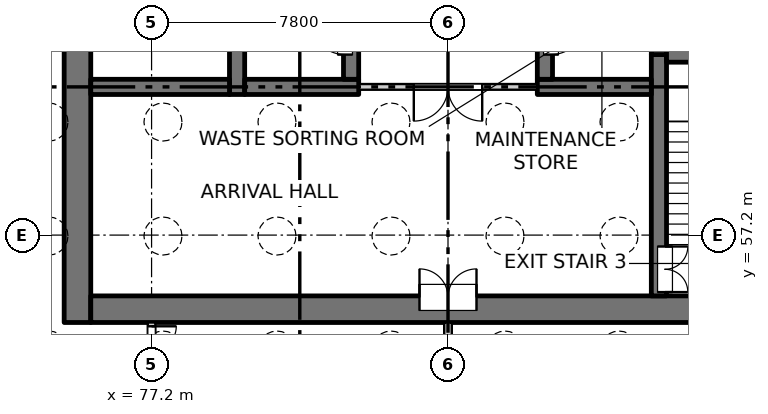
"""IFC4 building model, lengths in metres.
Left out: names, types, materials, properties, quantities, classifications, styles, units other than length and angle.
Written with IfcOpenShell. Run it as: python <this file> out.ifc"""

import sys

from ifc_helpers import new_model, si_unit, direction, frame, frame_2d, origin, place, context, subcontext, project, spatial, rectangle, extrude, element, fill, save


model = new_model("IFC4")
c1 = context("Model", 3, precision=1e-05, world=origin(), true_north=direction((0.0, 1.0)))
c2 = subcontext(c1, "Body", "Model", "MODEL_VIEW")
j1 = project(units=[si_unit("LENGTHUNIT", "METRE"), si_unit("PLANEANGLEUNIT", "RADIAN")], contexts=[c1])
p1 = place(None, origin())
s1 = spatial("IfcSite", under=j1, at=p1, CompositionType="ELEMENT")
p2 = place(p1, origin())
s2 = spatial("IfcBuilding", under=s1, at=p2, CompositionType="ELEMENT")
p3 = place(p2, frame((0.0, 0.0, -9.0)))
s3 = spatial("IfcBuildingStorey", under=s2, at=p3, CompositionType="ELEMENT", Elevation=-9.0)
p4 = place(p3, frame((75.25, 54.9, -0.5), z_axis=(0.0, 0.0, 1.0), x_axis=(0.0, 1.0, 0.0)))
e1 = element("IfcWall", 1, at=p4, inside=s3, PredefinedType="SOLIDWALL", context=c2, shape_type="SweptSolid", body=[
    extrude(rectangle(XDim=22.4, YDim=0.7, at=frame_2d((11.2, 0.0))), origin(), (0.0, 0.0, 1.0), 4.65),
])
p5 = place(p4, frame((7.55, 0.0, 0.5)))
e2 = element("IfcOpeningElement", 2, at=p5, cuts=e1, PredefinedType="OPENING", context=c2, shape_type="SweptSolid", body=[
    extrude(rectangle(XDim=0.9, YDim=2.1, at=frame_2d((0.45, 1.05))), frame((0.0, 0.36, 0.0), z_axis=(0.0, -1.0, 0.0), x_axis=(1.0, 0.0, 0.0)), (0.0, 0.0, 1.0), 0.72),
])
p6 = place(p4, frame((10.85, 0.0, 0.5)))
e3 = element("IfcOpeningElement", 3, at=p6, cuts=e1, PredefinedType="OPENING", context=c2, shape_type="SweptSolid", body=[
    extrude(rectangle(XDim=0.9, YDim=2.1, at=frame_2d((0.45, 1.05))), frame((0.0, 0.36, 0.0), z_axis=(0.0, -1.0, 0.0), x_axis=(1.0, 0.0, 0.0)), (0.0, 0.0, 1.0), 0.72),
])
p7 = place(p4, frame((13.85, 0.0, 0.5)))
e4 = element("IfcOpeningElement", 4, at=p7, cuts=e1, PredefinedType="OPENING", context=c2, shape_type="SweptSolid", body=[
    extrude(rectangle(XDim=0.9, YDim=2.1, at=frame_2d((0.45, 1.05))), frame((0.0, 0.36, 0.0), z_axis=(0.0, -1.0, 0.0), x_axis=(1.0, 0.0, 0.0)), (0.0, 0.0, 1.0), 0.72),
])
p8 = place(p4, frame((16.85, 0.0, 0.5)))
e5 = element("IfcOpeningElement", 5, at=p8, cuts=e1, PredefinedType="OPENING", context=c2, shape_type="SweptSolid", body=[
    extrude(rectangle(XDim=0.9, YDim=2.1, at=frame_2d((0.45, 1.05))), frame((0.0, 0.36, 0.0), z_axis=(0.0, -1.0, 0.0), x_axis=(1.0, 0.0, 0.0)), (0.0, 0.0, 1.0), 0.72),
])
p9 = place(p4, frame((20.15, 0.0, 0.5)))
e6 = element("IfcOpeningElement", 6, at=p9, cuts=e1, PredefinedType="OPENING", context=c2, shape_type="SweptSolid", body=[
    extrude(rectangle(XDim=0.9, YDim=2.1, at=frame_2d((0.45, 1.05))), frame((0.0, 0.36, 0.0), z_axis=(0.0, -1.0, 0.0), x_axis=(1.0, 0.0, 0.0)), (0.0, 0.0, 1.0), 0.72),
])
p10 = place(p3, frame((75.6, 55.25, -0.5), z_axis=(0.0, 0.0, 1.0), x_axis=(1.0, 0.0, 0.0)))
e7 = element("IfcWall", 7, at=p10, inside=s3, PredefinedType="SOLIDWALL", context=c2, shape_type="SweptSolid", body=[
    extrude(rectangle(XDim=18.8, YDim=0.7, at=frame_2d((9.4, 0.0))), origin(), (0.0, 0.0, 1.0), 4.65),
])
p11 = place(p10, frame((8.65, 0.0, 0.5)))
e8 = element("IfcOpeningElement", 8, at=p11, cuts=e7, PredefinedType="OPENING", context=c2, shape_type="SweptSolid", body=[
    extrude(rectangle(XDim=1.5, YDim=2.1, at=frame_2d((0.75, 1.05))), frame((0.0, 0.36, 0.0), z_axis=(0.0, -1.0, 0.0), x_axis=(1.0, 0.0, 0.0)), (0.0, 0.0, 1.0), 0.72),
])
p12 = place(p3, frame((79.45, 60.9, -0.5), z_axis=(0.0, 0.0, 1.0), x_axis=(0.0, 1.0, 0.0)))
e9 = element("IfcWall", 9, at=p12, inside=s3, PredefinedType="SOLIDWALL", context=c2, shape_type="SweptSolid", body=[
    extrude(rectangle(XDim=16.4, YDim=0.4, at=frame_2d((8.2, 0.0))), origin(), (0.0, 0.0, 1.0), 4.65),
])
p13 = place(p3, frame((90.55, 55.6, -0.5), z_axis=(0.0, 0.0, 1.0), x_axis=(0.0, 1.0, 0.0)))
e10 = element("IfcWall", 10, at=p13, inside=s3, PredefinedType="SOLIDWALL", context=c2, shape_type="SweptSolid", body=[
    extrude(rectangle(XDim=6.35, YDim=0.4, at=frame_2d((3.175, 0.0))), origin(), (0.0, 0.0, 1.0), 4.65),
])
p14 = place(p13, frame((0.1, 0.0, 0.5)))
e11 = element("IfcOpeningElement", 11, at=p14, cuts=e10, PredefinedType="OPENING", context=c2, shape_type="SweptSolid", body=[
    extrude(rectangle(XDim=1.2, YDim=2.1, at=frame_2d((0.6, 1.05))), frame((0.0, 0.21, 0.0), z_axis=(0.0, -1.0, 0.0), x_axis=(1.0, 0.0, 0.0)), (0.0, 0.0, 1.0), 0.42),
])
p15 = place(p3, frame((90.55, 61.95, -0.5), z_axis=(0.0, 0.0, 1.0), x_axis=(0.0, 1.0, 0.0)))
e12 = element("IfcWall", 12, at=p15, inside=s3, PredefinedType="SOLIDWALL", context=c2, shape_type="SweptSolid", body=[
    extrude(rectangle(XDim=15.35, YDim=0.4, at=frame_2d((7.675, 0.0))), origin(), (0.0, 0.0, 1.0), 4.65),
])
p16 = place(p3, frame((79.65, 61.1, -0.5), z_axis=(0.0, 0.0, 1.0), x_axis=(1.0, 0.0, 0.0)))
e13 = element("IfcWall", 13, at=p16, inside=s3, PredefinedType="SOLIDWALL", context=c2, shape_type="SweptSolid", body=[
    extrude(rectangle(XDim=3.0, YDim=0.4, at=frame_2d((1.5, 0.0))), origin(), (0.0, 0.0, 1.0), 4.65),
])
p17 = place(p3, frame((82.45, 61.3, -0.5), z_axis=(0.0, 0.0, 1.0), x_axis=(0.0, 1.0, 0.0)))
e14 = element("IfcWall", 14, at=p17, inside=s3, PredefinedType="SOLIDWALL", context=c2, shape_type="SweptSolid", body=[
    extrude(rectangle(XDim=2.2, YDim=0.4, at=frame_2d((1.1, 0.0))), origin(), (0.0, 0.0, 1.0), 4.65),
])
p18 = place(p17, frame((0.65, 0.0, 0.5)))
e15 = element("IfcOpeningElement", 15, at=p18, cuts=e14, PredefinedType="OPENING", context=c2, shape_type="SweptSolid", body=[
    extrude(rectangle(XDim=0.9, YDim=2.1, at=frame_2d((0.45, 1.05))), frame((0.0, 0.21, 0.0), z_axis=(0.0, -1.0, 0.0), x_axis=(1.0, 0.0, 0.0)), (0.0, 0.0, 1.0), 0.42),
])
p19 = place(p3, frame((87.35, 61.1, -0.5), z_axis=(0.0, 0.0, 1.0), x_axis=(1.0, 0.0, 0.0)))
e16 = element("IfcWall", 16, at=p19, inside=s3, PredefinedType="SOLIDWALL", context=c2, shape_type="SweptSolid", body=[
    extrude(rectangle(XDim=3.0, YDim=0.4, at=frame_2d((1.5, 0.0))), origin(), (0.0, 0.0, 1.0), 4.65),
])
p20 = place(p3, frame((87.55, 61.3, -0.5), z_axis=(0.0, 0.0, 1.0), x_axis=(0.0, 1.0, 0.0)))
e17 = element("IfcWall", 17, at=p20, inside=s3, PredefinedType="SOLIDWALL", context=c2, shape_type="SweptSolid", body=[
    extrude(rectangle(XDim=2.2, YDim=0.4, at=frame_2d((1.1, 0.0))), origin(), (0.0, 0.0, 1.0), 4.65),
])
p21 = place(p20, frame((0.65, 0.0, 0.5)))
e18 = element("IfcOpeningElement", 18, at=p21, cuts=e17, PredefinedType="OPENING", context=c2, shape_type="SweptSolid", body=[
    extrude(rectangle(XDim=0.9, YDim=2.1, at=frame_2d((0.45, 1.05))), frame((0.0, 0.21, 0.0), z_axis=(0.0, -1.0, 0.0), x_axis=(1.0, 0.0, 0.0)), (0.0, 0.0, 1.0), 0.42),
])
for number, where, z_axis, x_axis in (
    (19, (75.6, 61.1, -0.5), (0.0, 0.0, 1.0), (1.0, 0.0, 0.0)),
    (20, (90.75, 61.95, -0.5), (0.0, 0.0, 1.0), (1.0, 0.0, 0.0)),
):
    element("IfcWall", number, at=place(p3, frame(where, z_axis=z_axis, x_axis=x_axis)), inside=s3, PredefinedType="SOLIDWALL", context=c2, shape_type="SweptSolid", body=[
        extrude(rectangle(XDim=3.65, YDim=0.4, at=frame_2d((1.825, 0.0))), origin(), (0.0, 0.0, 1.0), 4.65),
    ])
p22 = place(p3, frame((82.65, 61.1, 0.0), z_axis=(0.0, 0.0, 1.0), x_axis=(1.0, 0.0, 0.0)))
e21 = element("IfcWall", 21, at=p22, inside=s3, PredefinedType="PARTITIONING", context=c2, shape_type="SweptSolid", body=[
    extrude(rectangle(XDim=4.7, YDim=0.15, at=frame_2d((2.35, 0.0))), origin(), (0.0, 0.0, 1.0), 4.15),
])
p23 = place(p22, frame((1.45, 0.0, 0.0)))
e22 = element("IfcOpeningElement", 22, at=p23, cuts=e21, PredefinedType="OPENING", context=c2, shape_type="SweptSolid", body=[
    extrude(rectangle(XDim=1.8, YDim=2.1, at=frame_2d((0.9, 1.05))), frame((0.0, 0.085, 0.0), z_axis=(0.0, -1.0, 0.0), x_axis=(1.0, 0.0, 0.0)), (0.0, 0.0, 1.0), 0.17),
])
p24 = place(p3, frame((77.2, 53.4, 0.0), z_axis=(0.0, 0.0, 1.0), x_axis=(0.0, 1.0, 0.0)))
e23 = element("IfcWall", 23, at=p24, inside=s3, PredefinedType="PARTITIONING", context=c2, shape_type="SweptSolid", body=[
    extrude(rectangle(XDim=1.5, YDim=0.2, at=frame_2d((0.75, 0.0))), origin(), (0.0, 0.0, 1.0), 4.15),
])
p25 = place(p24, frame((0.1, 0.0, 0.0)))
e24 = element("IfcOpeningElement", 24, at=p25, cuts=e23, PredefinedType="OPENING", context=c2, shape_type="SweptSolid", body=[
    extrude(rectangle(XDim=1.3, YDim=2.1, at=frame_2d((0.65, 1.05))), frame((0.0, 0.11, 0.0), z_axis=(0.0, -1.0, 0.0), x_axis=(1.0, 0.0, 0.0)), (0.0, 0.0, 1.0), 0.22),
])
p26 = place(p3, frame((85.0, 22.4, 0.0), z_axis=(0.0, 0.0, 1.0), x_axis=(0.0, 1.0, 0.0)))
e25 = element("IfcWall", 25, at=p26, inside=s3, PredefinedType="PARTITIONING", context=c2, shape_type="SweptSolid", body=[
    extrude(rectangle(XDim=32.5, YDim=0.2, at=frame_2d((16.25, 0.0))), origin(), (0.0, 0.0, 1.0), 4.15),
])
p27 = place(p25, origin())
e26 = element("IfcDoor", 26, at=p27, inside=s3, OperationType="DOUBLE_DOOR_SINGLE_SWING", PredefinedType="DOOR", context=c2, shape_type="SweptSolid", body=[
    extrude(rectangle(XDim=1.3, YDim=2.1, at=frame_2d((0.65, 1.05))), frame((0.0, 0.025, 0.0), z_axis=(0.0, -1.0, 0.0), x_axis=(1.0, 0.0, 0.0)), (0.0, 0.0, 1.0), 0.05),
])
fill(e24, e26)
p28 = place(p11, origin())
e27 = element("IfcDoor", 27, at=p28, inside=s3, OperationType="DOUBLE_DOOR_SINGLE_SWING", PredefinedType="DOOR", context=c2, shape_type="SweptSolid", body=[
    extrude(rectangle(XDim=1.5, YDim=2.1, at=frame_2d((0.75, 1.05))), frame((0.0, 0.335, 0.0), z_axis=(0.0, -1.0, 0.0), x_axis=(1.0, 0.0, 0.0)), (0.0, 0.0, 1.0), 0.05),
])
fill(e8, e27)
p29 = place(p14, origin())
e28 = element("IfcDoor", 28, at=p29, inside=s3, OperationType="DOUBLE_DOOR_SINGLE_SWING", PredefinedType="DOOR", context=c2, shape_type="SweptSolid", body=[
    extrude(rectangle(XDim=1.2, YDim=2.1, at=frame_2d((0.6, 1.05))), frame((0.0, -0.135, 0.0), z_axis=(0.0, -1.0, 0.0), x_axis=(1.0, 0.0, 0.0)), (0.0, 0.0, 1.0), 0.05),
])
fill(e11, e28)
p30 = place(p23, origin())
e29 = element("IfcDoor", 29, at=p30, inside=s3, OperationType="DOUBLE_DOOR_SINGLE_SWING", PredefinedType="DOOR", context=c2, shape_type="SweptSolid", body=[
    extrude(rectangle(XDim=1.8, YDim=2.1, at=frame_2d((0.9, 1.05))), frame((0.0, 0.025, 0.0), z_axis=(0.0, -1.0, 0.0), x_axis=(1.0, 0.0, 0.0)), (0.0, 0.0, 1.0), 0.05),
])
fill(e22, e29)
p31 = place(p18, origin())
e30 = element("IfcDoor", 30, at=p31, inside=s3, OperationType="SINGLE_SWING_RIGHT", PredefinedType="DOOR", context=c2, shape_type="SweptSolid", body=[
    extrude(rectangle(XDim=0.9, YDim=2.1, at=frame_2d((0.45, 1.05))), frame((0.0, 0.185, 0.0), z_axis=(0.0, -1.0, 0.0), x_axis=(1.0, 0.0, 0.0)), (0.0, 0.0, 1.0), 0.05),
])
fill(e15, e30)
p32 = place(p21, origin())
e31 = element("IfcDoor", 31, at=p32, inside=s3, OperationType="SINGLE_SWING_LEFT", PredefinedType="DOOR", context=c2, shape_type="SweptSolid", body=[
    extrude(rectangle(XDim=0.9, YDim=2.1, at=frame_2d((0.45, 1.05))), frame((0.0, -0.135, 0.0), z_axis=(0.0, -1.0, 0.0), x_axis=(1.0, 0.0, 0.0)), (0.0, 0.0, 1.0), 0.05),
])
fill(e18, e31)
save(model, sys.argv[1])
